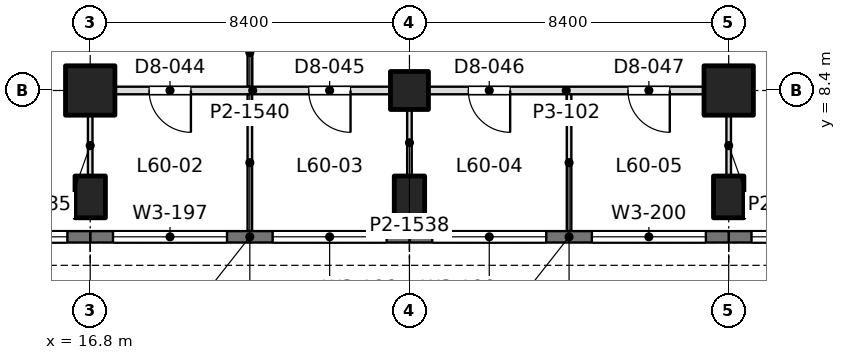
"""IFC4 building model, lengths in metres.
Left out: names, types, materials, properties, quantities, classifications, styles, units other than length and angle.
Written with IfcOpenShell. Run it as: python <this file> out.ifc"""

import sys

from ifc_helpers import new_model, si_unit, direction, frame, frame_2d, origin, origin_2d, place, context, subcontext, project, spatial, rectangle, extrude, element, fill, save


model = new_model("IFC4")
c1 = context("Model", 3, precision=1e-05, world=origin(), true_north=direction((0.0, 1.0)))
c2 = subcontext(c1, "Body", "Model", "MODEL_VIEW")
j1 = project(units=[si_unit("LENGTHUNIT", "METRE"), si_unit("PLANEANGLEUNIT", "RADIAN")], contexts=[c1])
p1 = place(None, origin())
s1 = spatial("IfcSite", under=j1, at=p1, CompositionType="ELEMENT")
p2 = place(p1, origin())
s2 = spatial("IfcBuilding", under=s1, at=p2, CompositionType="ELEMENT")
p3 = place(p2, frame((0.0, 0.0, 263.7)))
s3 = spatial("IfcBuildingStorey", under=s2, at=p3, CompositionType="ELEMENT", Elevation=263.7)
p4 = place(p3, frame((16.8, 5.6, 0.0), z_axis=(0.0, 0.0, 1.0), x_axis=(1.0, 0.0, 0.0)))
e1 = element("IfcColumn", 1, at=p4, inside=s3, PredefinedType="COLUMN", context=c2, shape_type="SweptSolid", body=[
    extrude(rectangle(XDim=0.8, YDim=1.1, at=origin_2d()), origin(), (0.0, 0.0, 1.0), 4.5),
])
p5 = place(p3, frame((16.8, 8.4, 0.0), z_axis=(0.0, 0.0, 1.0), x_axis=(1.0, 0.0, 0.0)))
e2 = element("IfcColumn", 2, at=p5, inside=s3, PredefinedType="COLUMN", context=c2, shape_type="SweptSolid", body=[
    extrude(rectangle(XDim=1.3, YDim=1.3, at=origin_2d()), origin(), (0.0, 0.0, 1.0), 4.5),
])
p6 = place(p3, frame((25.2, 5.6, 0.0), z_axis=(0.0, 0.0, 1.0), x_axis=(1.0, 0.0, 0.0)))
e3 = element("IfcColumn", 3, at=p6, inside=s3, PredefinedType="COLUMN", context=c2, shape_type="SweptSolid", body=[
    extrude(rectangle(XDim=0.8, YDim=1.1, at=origin_2d()), origin(), (0.0, 0.0, 1.0), 4.5),
])
p7 = place(p3, frame((25.2, 8.4, 0.0), z_axis=(0.0, 0.0, 1.0), x_axis=(1.0, 0.0, 0.0)))
e4 = element("IfcColumn", 4, at=p7, inside=s3, PredefinedType="COLUMN", context=c2, shape_type="SweptSolid", body=[
    extrude(rectangle(XDim=1.0, YDim=1.0, at=origin_2d()), origin(), (0.0, 0.0, 1.0), 4.5),
])
p8 = place(p3, frame((33.6, 5.6, 0.0), z_axis=(0.0, 0.0, 1.0), x_axis=(1.0, 0.0, 0.0)))
e5 = element("IfcColumn", 5, at=p8, inside=s3, PredefinedType="COLUMN", context=c2, shape_type="SweptSolid", body=[
    extrude(rectangle(XDim=0.8, YDim=1.1, at=origin_2d()), origin(), (0.0, 0.0, 1.0), 4.5),
])
p9 = place(p3, frame((33.6, 8.4, 0.0), z_axis=(0.0, 0.0, 1.0), x_axis=(1.0, 0.0, 0.0)))
e6 = element("IfcColumn", 6, at=p9, inside=s3, PredefinedType="COLUMN", context=c2, shape_type="SweptSolid", body=[
    extrude(rectangle(XDim=1.3, YDim=1.3, at=origin_2d()), origin(), (0.0, 0.0, 1.0), 4.5),
])
p10 = place(p3, frame((42.0, 4.55, 0.0), z_axis=(0.0, 0.0, 1.0), x_axis=(-1.0, 0.0, 0.0)))
e7 = element("IfcWall", 7, at=p10, inside=s3, PredefinedType="SOLIDWALL", context=c2, shape_type="SweptSolid", body=[
    extrude(rectangle(XDim=8.4, YDim=0.3, at=frame_2d((4.2, 0.0))), origin(), (0.0, 0.0, 1.0), 4.35),
])
p11 = place(p10, frame((0.6, 0.0, 0.9)))
e8 = element("IfcOpeningElement", 8, at=p11, cuts=e7, PredefinedType="OPENING", context=c2, shape_type="SweptSolid", body=[
    extrude(rectangle(XDim=3.0, YDim=2.4, at=frame_2d((1.5, 1.2))), frame((0.0, 0.16, 0.0), z_axis=(0.0, -1.0, 0.0), x_axis=(1.0, 0.0, 0.0)), (0.0, 0.0, 1.0), 0.32),
])
p12 = place(p10, frame((4.8, 0.0, 0.9)))
e9 = element("IfcOpeningElement", 9, at=p12, cuts=e7, PredefinedType="OPENING", context=c2, shape_type="SweptSolid", body=[
    extrude(rectangle(XDim=3.0, YDim=2.4, at=frame_2d((1.5, 1.2))), frame((0.0, 0.16, 0.0), z_axis=(0.0, -1.0, 0.0), x_axis=(1.0, 0.0, 0.0)), (0.0, 0.0, 1.0), 0.32),
])
p13 = place(p3, frame((33.6, 4.55, 0.0), z_axis=(0.0, 0.0, 1.0), x_axis=(-1.0, 0.0, 0.0)))
e10 = element("IfcWall", 10, at=p13, inside=s3, PredefinedType="SOLIDWALL", context=c2, shape_type="SweptSolid", body=[
    extrude(rectangle(XDim=8.4, YDim=0.3, at=frame_2d((4.2, 0.0))), origin(), (0.0, 0.0, 1.0), 4.35),
])
p14 = place(p13, frame((0.6, 0.0, 0.9)))
e11 = element("IfcOpeningElement", 11, at=p14, cuts=e10, PredefinedType="OPENING", context=c2, shape_type="SweptSolid", body=[
    extrude(rectangle(XDim=3.0, YDim=2.4, at=frame_2d((1.5, 1.2))), frame((0.0, 0.16, 0.0), z_axis=(0.0, -1.0, 0.0), x_axis=(1.0, 0.0, 0.0)), (0.0, 0.0, 1.0), 0.32),
])
p15 = place(p13, frame((4.8, 0.0, 0.9)))
e12 = element("IfcOpeningElement", 12, at=p15, cuts=e10, PredefinedType="OPENING", context=c2, shape_type="SweptSolid", body=[
    extrude(rectangle(XDim=3.0, YDim=2.4, at=frame_2d((1.5, 1.2))), frame((0.0, 0.16, 0.0), z_axis=(0.0, -1.0, 0.0), x_axis=(1.0, 0.0, 0.0)), (0.0, 0.0, 1.0), 0.32),
])
p16 = place(p3, frame((25.2, 4.55, 0.0), z_axis=(0.0, 0.0, 1.0), x_axis=(-1.0, 0.0, 0.0)))
e13 = element("IfcWall", 13, at=p16, inside=s3, PredefinedType="SOLIDWALL", context=c2, shape_type="SweptSolid", body=[
    extrude(rectangle(XDim=8.4, YDim=0.3, at=frame_2d((4.2, 0.0))), origin(), (0.0, 0.0, 1.0), 4.35),
])
p17 = place(p16, frame((0.6, 0.0, 0.9)))
e14 = element("IfcOpeningElement", 14, at=p17, cuts=e13, PredefinedType="OPENING", context=c2, shape_type="SweptSolid", body=[
    extrude(rectangle(XDim=3.0, YDim=2.4, at=frame_2d((1.5, 1.2))), frame((0.0, 0.16, 0.0), z_axis=(0.0, -1.0, 0.0), x_axis=(1.0, 0.0, 0.0)), (0.0, 0.0, 1.0), 0.32),
])
p18 = place(p16, frame((4.8, 0.0, 0.9)))
e15 = element("IfcOpeningElement", 15, at=p18, cuts=e13, PredefinedType="OPENING", context=c2, shape_type="SweptSolid", body=[
    extrude(rectangle(XDim=3.0, YDim=2.4, at=frame_2d((1.5, 1.2))), frame((0.0, 0.16, 0.0), z_axis=(0.0, -1.0, 0.0), x_axis=(1.0, 0.0, 0.0)), (0.0, 0.0, 1.0), 0.32),
])
p19 = place(p3, frame((16.8, 4.55, 0.0), z_axis=(0.0, 0.0, 1.0), x_axis=(-1.0, 0.0, 0.0)))
e16 = element("IfcWall", 16, at=p19, inside=s3, PredefinedType="SOLIDWALL", context=c2, shape_type="SweptSolid", body=[
    extrude(rectangle(XDim=8.4, YDim=0.3, at=frame_2d((4.2, 0.0))), origin(), (0.0, 0.0, 1.0), 4.35),
])
p20 = place(p19, frame((0.6, 0.0, 0.9)))
e17 = element("IfcOpeningElement", 17, at=p20, cuts=e16, PredefinedType="OPENING", context=c2, shape_type="SweptSolid", body=[
    extrude(rectangle(XDim=3.0, YDim=2.4, at=frame_2d((1.5, 1.2))), frame((0.0, 0.16, 0.0), z_axis=(0.0, -1.0, 0.0), x_axis=(1.0, 0.0, 0.0)), (0.0, 0.0, 1.0), 0.32),
])
p21 = place(p19, frame((4.8, 0.0, 0.9)))
e18 = element("IfcOpeningElement", 18, at=p21, cuts=e16, PredefinedType="OPENING", context=c2, shape_type="SweptSolid", body=[
    extrude(rectangle(XDim=3.0, YDim=2.4, at=frame_2d((1.5, 1.2))), frame((0.0, 0.16, 0.0), z_axis=(0.0, -1.0, 0.0), x_axis=(1.0, 0.0, 0.0)), (0.0, 0.0, 1.0), 0.32),
])
p22 = place(p3, frame((17.449, 8.4, 0.0), z_axis=(0.0, 0.0, 1.0), x_axis=(1.0, 0.0, 0.0)))
e19 = element("IfcWall", 19, at=p22, inside=s3, PredefinedType="PARTITIONING", context=c2, shape_type="SweptSolid", body=[
    extrude(rectangle(XDim=7.252, YDim=0.2, at=frame_2d((3.626, 0.0))), origin(), (0.0, 0.0, 1.0), 3.8),
])
p23 = place(p22, frame((0.901, 0.0, 0.0)))
e20 = element("IfcOpeningElement", 20, at=p23, cuts=e19, PredefinedType="OPENING", context=c2, shape_type="SweptSolid", body=[
    extrude(rectangle(XDim=1.1, YDim=2.4, at=frame_2d((0.55, 1.2))), frame((0.0, 0.11, 0.0), z_axis=(0.0, -1.0, 0.0), x_axis=(1.0, 0.0, 0.0)), (0.0, 0.0, 1.0), 0.22),
])
p24 = place(p22, frame((5.101, 0.0, 0.0)))
e21 = element("IfcOpeningElement", 21, at=p24, cuts=e19, PredefinedType="OPENING", context=c2, shape_type="SweptSolid", body=[
    extrude(rectangle(XDim=1.1, YDim=2.4, at=frame_2d((0.55, 1.2))), frame((0.0, 0.11, 0.0), z_axis=(0.0, -1.0, 0.0), x_axis=(1.0, 0.0, 0.0)), (0.0, 0.0, 1.0), 0.22),
])
p25 = place(p3, frame((25.699, 8.4, 0.0), z_axis=(0.0, 0.0, 1.0), x_axis=(1.0, 0.0, 0.0)))
e22 = element("IfcWall", 22, at=p25, inside=s3, PredefinedType="PARTITIONING", context=c2, shape_type="SweptSolid", body=[
    extrude(rectangle(XDim=7.252, YDim=0.2, at=frame_2d((3.626, 0.0))), origin(), (0.0, 0.0, 1.0), 3.8),
])
p26 = place(p25, frame((1.051, 0.0, 0.0)))
e23 = element("IfcOpeningElement", 23, at=p26, cuts=e22, PredefinedType="OPENING", context=c2, shape_type="SweptSolid", body=[
    extrude(rectangle(XDim=1.1, YDim=2.4, at=frame_2d((0.55, 1.2))), frame((0.0, 0.11, 0.0), z_axis=(0.0, -1.0, 0.0), x_axis=(1.0, 0.0, 0.0)), (0.0, 0.0, 1.0), 0.22),
])
p27 = place(p25, frame((5.251, 0.0, 0.0)))
e24 = element("IfcOpeningElement", 24, at=p27, cuts=e22, PredefinedType="OPENING", context=c2, shape_type="SweptSolid", body=[
    extrude(rectangle(XDim=1.1, YDim=2.4, at=frame_2d((0.55, 1.2))), frame((0.0, 0.11, 0.0), z_axis=(0.0, -1.0, 0.0), x_axis=(1.0, 0.0, 0.0)), (0.0, 0.0, 1.0), 0.22),
])
p28 = place(p3, frame((16.8, 6.149, 0.0), z_axis=(0.0, 0.0, 1.0), x_axis=(0.0, 1.0, 0.0)))
e25 = element("IfcWall", 25, at=p28, inside=s3, PredefinedType="PARTITIONING", context=c2, shape_type="SweptSolid", body=[
    extrude(rectangle(XDim=1.602, YDim=0.12, at=frame_2d((0.801, 0.0))), origin(), (0.0, 0.0, 1.0), 3.99),
])
p29 = place(p3, frame((21.0, 4.7, 0.0), z_axis=(0.0, 0.0, 1.0), x_axis=(0.0, 1.0, 0.0)))
e26 = element("IfcWall", 26, at=p29, inside=s3, PredefinedType="PARTITIONING", context=c2, shape_type="SweptSolid", body=[
    extrude(rectangle(XDim=3.602, YDim=0.12, at=frame_2d((1.801, 0.0))), origin(), (0.0, 0.0, 1.0), 3.8),
])
p30 = place(p3, frame((25.2, 6.149, 0.0), z_axis=(0.0, 0.0, 1.0), x_axis=(0.0, 1.0, 0.0)))
e27 = element("IfcWall", 27, at=p30, inside=s3, PredefinedType="PARTITIONING", context=c2, shape_type="SweptSolid", body=[
    extrude(rectangle(XDim=1.752, YDim=0.12, at=frame_2d((0.876, 0.0))), origin(), (0.0, 0.0, 1.0), 3.99),
])
p31 = place(p3, frame((29.4, 4.7, 0.0), z_axis=(0.0, 0.0, 1.0), x_axis=(0.0, 1.0, 0.0)))
e28 = element("IfcWall", 28, at=p31, inside=s3, PredefinedType="PARTITIONING", context=c2, shape_type="SweptSolid", body=[
    extrude(rectangle(XDim=3.602, YDim=0.12, at=frame_2d((1.801, 0.0))), origin(), (0.0, 0.0, 1.0), 3.8),
])
p32 = place(p3, frame((33.6, 6.149, 0.0), z_axis=(0.0, 0.0, 1.0), x_axis=(0.0, 1.0, 0.0)))
e29 = element("IfcWall", 29, at=p32, inside=s3, PredefinedType="PARTITIONING", context=c2, shape_type="SweptSolid", body=[
    extrude(rectangle(XDim=1.602, YDim=0.12, at=frame_2d((0.801, 0.0))), origin(), (0.0, 0.0, 1.0), 3.99),
])
p33 = place(p3, frame((21.0, 8.498, 0.0), z_axis=(0.0, 0.0, 1.0), x_axis=(0.0, 1.0, 0.0)))
e30 = element("IfcWall", 30, at=p33, inside=s3, PredefinedType="PARTITIONING", context=c2, shape_type="SweptSolid", body=[
    extrude(rectangle(XDim=1.804, YDim=0.12, at=frame_2d((0.902, 0.0))), origin(), (0.0, 0.0, 1.0), 3.8),
])
p34 = place(p12, origin())
e31 = element("IfcWindow", 31, at=p34, inside=s3, PartitioningType="SINGLE_PANEL", PredefinedType="WINDOW", context=c2, shape_type="SweptSolid", body=[
    extrude(rectangle(XDim=3.0, YDim=2.4, at=frame_2d((1.5, 1.2))), frame((0.0, 0.03, 0.0), z_axis=(0.0, -1.0, 0.0), x_axis=(1.0, 0.0, 0.0)), (0.0, 0.0, 1.0), 0.06),
])
fill(e9, e31)
p35 = place(p14, origin())
e32 = element("IfcWindow", 32, at=p35, inside=s3, PartitioningType="SINGLE_PANEL", PredefinedType="WINDOW", context=c2, shape_type="SweptSolid", body=[
    extrude(rectangle(XDim=3.0, YDim=2.4, at=frame_2d((1.5, 1.2))), frame((0.0, 0.03, 0.0), z_axis=(0.0, -1.0, 0.0), x_axis=(1.0, 0.0, 0.0)), (0.0, 0.0, 1.0), 0.06),
])
fill(e11, e32)
p36 = place(p15, origin())
e33 = element("IfcWindow", 33, at=p36, inside=s3, PartitioningType="SINGLE_PANEL", PredefinedType="WINDOW", context=c2, shape_type="SweptSolid", body=[
    extrude(rectangle(XDim=3.0, YDim=2.4, at=frame_2d((1.5, 1.2))), frame((0.0, 0.03, 0.0), z_axis=(0.0, -1.0, 0.0), x_axis=(1.0, 0.0, 0.0)), (0.0, 0.0, 1.0), 0.06),
])
fill(e12, e33)
p37 = place(p17, origin())
e34 = element("IfcWindow", 34, at=p37, inside=s3, PartitioningType="SINGLE_PANEL", PredefinedType="WINDOW", context=c2, shape_type="SweptSolid", body=[
    extrude(rectangle(XDim=3.0, YDim=2.4, at=frame_2d((1.5, 1.2))), frame((0.0, 0.03, 0.0), z_axis=(0.0, -1.0, 0.0), x_axis=(1.0, 0.0, 0.0)), (0.0, 0.0, 1.0), 0.06),
])
fill(e14, e34)
p38 = place(p18, origin())
e35 = element("IfcWindow", 35, at=p38, inside=s3, PartitioningType="SINGLE_PANEL", PredefinedType="WINDOW", context=c2, shape_type="SweptSolid", body=[
    extrude(rectangle(XDim=3.0, YDim=2.4, at=frame_2d((1.5, 1.2))), frame((0.0, 0.03, 0.0), z_axis=(0.0, -1.0, 0.0), x_axis=(1.0, 0.0, 0.0)), (0.0, 0.0, 1.0), 0.06),
])
fill(e15, e35)
p39 = place(p20, origin())
e36 = element("IfcWindow", 36, at=p39, inside=s3, PartitioningType="SINGLE_PANEL", PredefinedType="WINDOW", context=c2, shape_type="SweptSolid", body=[
    extrude(rectangle(XDim=3.0, YDim=2.4, at=frame_2d((1.5, 1.2))), frame((0.0, 0.03, 0.0), z_axis=(0.0, -1.0, 0.0), x_axis=(1.0, 0.0, 0.0)), (0.0, 0.0, 1.0), 0.06),
])
fill(e17, e36)
p40 = place(p23, frame((1.1, 0.0, 0.0), z_axis=(0.0, 0.0, 1.0), x_axis=(-1.0, 0.0, 0.0)))
e37 = element("IfcDoor", 37, at=p40, inside=s3, OperationType="SINGLE_SWING_LEFT", PredefinedType="DOOR", context=c2, shape_type="SweptSolid", body=[
    extrude(rectangle(XDim=1.1, YDim=2.4, at=frame_2d((0.55, 1.2))), frame((0.0, 0.025, 0.0), z_axis=(0.0, -1.0, 0.0), x_axis=(1.0, 0.0, 0.0)), (0.0, 0.0, 1.0), 0.05),
])
fill(e20, e37)
p41 = place(p24, frame((1.1, 0.0, 0.0), z_axis=(0.0, 0.0, 1.0), x_axis=(-1.0, 0.0, 0.0)))
e38 = element("IfcDoor", 38, at=p41, inside=s3, OperationType="SINGLE_SWING_LEFT", PredefinedType="DOOR", context=c2, shape_type="SweptSolid", body=[
    extrude(rectangle(XDim=1.1, YDim=2.4, at=frame_2d((0.55, 1.2))), frame((0.0, 0.025, 0.0), z_axis=(0.0, -1.0, 0.0), x_axis=(1.0, 0.0, 0.0)), (0.0, 0.0, 1.0), 0.05),
])
fill(e21, e38)
p42 = place(p26, frame((1.1, 0.0, 0.0), z_axis=(0.0, 0.0, 1.0), x_axis=(-1.0, 0.0, 0.0)))
e39 = element("IfcDoor", 39, at=p42, inside=s3, OperationType="SINGLE_SWING_LEFT", PredefinedType="DOOR", context=c2, shape_type="SweptSolid", body=[
    extrude(rectangle(XDim=1.1, YDim=2.4, at=frame_2d((0.55, 1.2))), frame((0.0, 0.025, 0.0), z_axis=(0.0, -1.0, 0.0), x_axis=(1.0, 0.0, 0.0)), (0.0, 0.0, 1.0), 0.05),
])
fill(e23, e39)
p43 = place(p27, frame((1.1, 0.0, 0.0), z_axis=(0.0, 0.0, 1.0), x_axis=(-1.0, 0.0, 0.0)))
e40 = element("IfcDoor", 40, at=p43, inside=s3, OperationType="SINGLE_SWING_LEFT", PredefinedType="DOOR", context=c2, shape_type="SweptSolid", body=[
    extrude(rectangle(XDim=1.1, YDim=2.4, at=frame_2d((0.55, 1.2))), frame((0.0, 0.025, 0.0), z_axis=(0.0, -1.0, 0.0), x_axis=(1.0, 0.0, 0.0)), (0.0, 0.0, 1.0), 0.05),
])
fill(e24, e40)
save(model, sys.argv[1])
